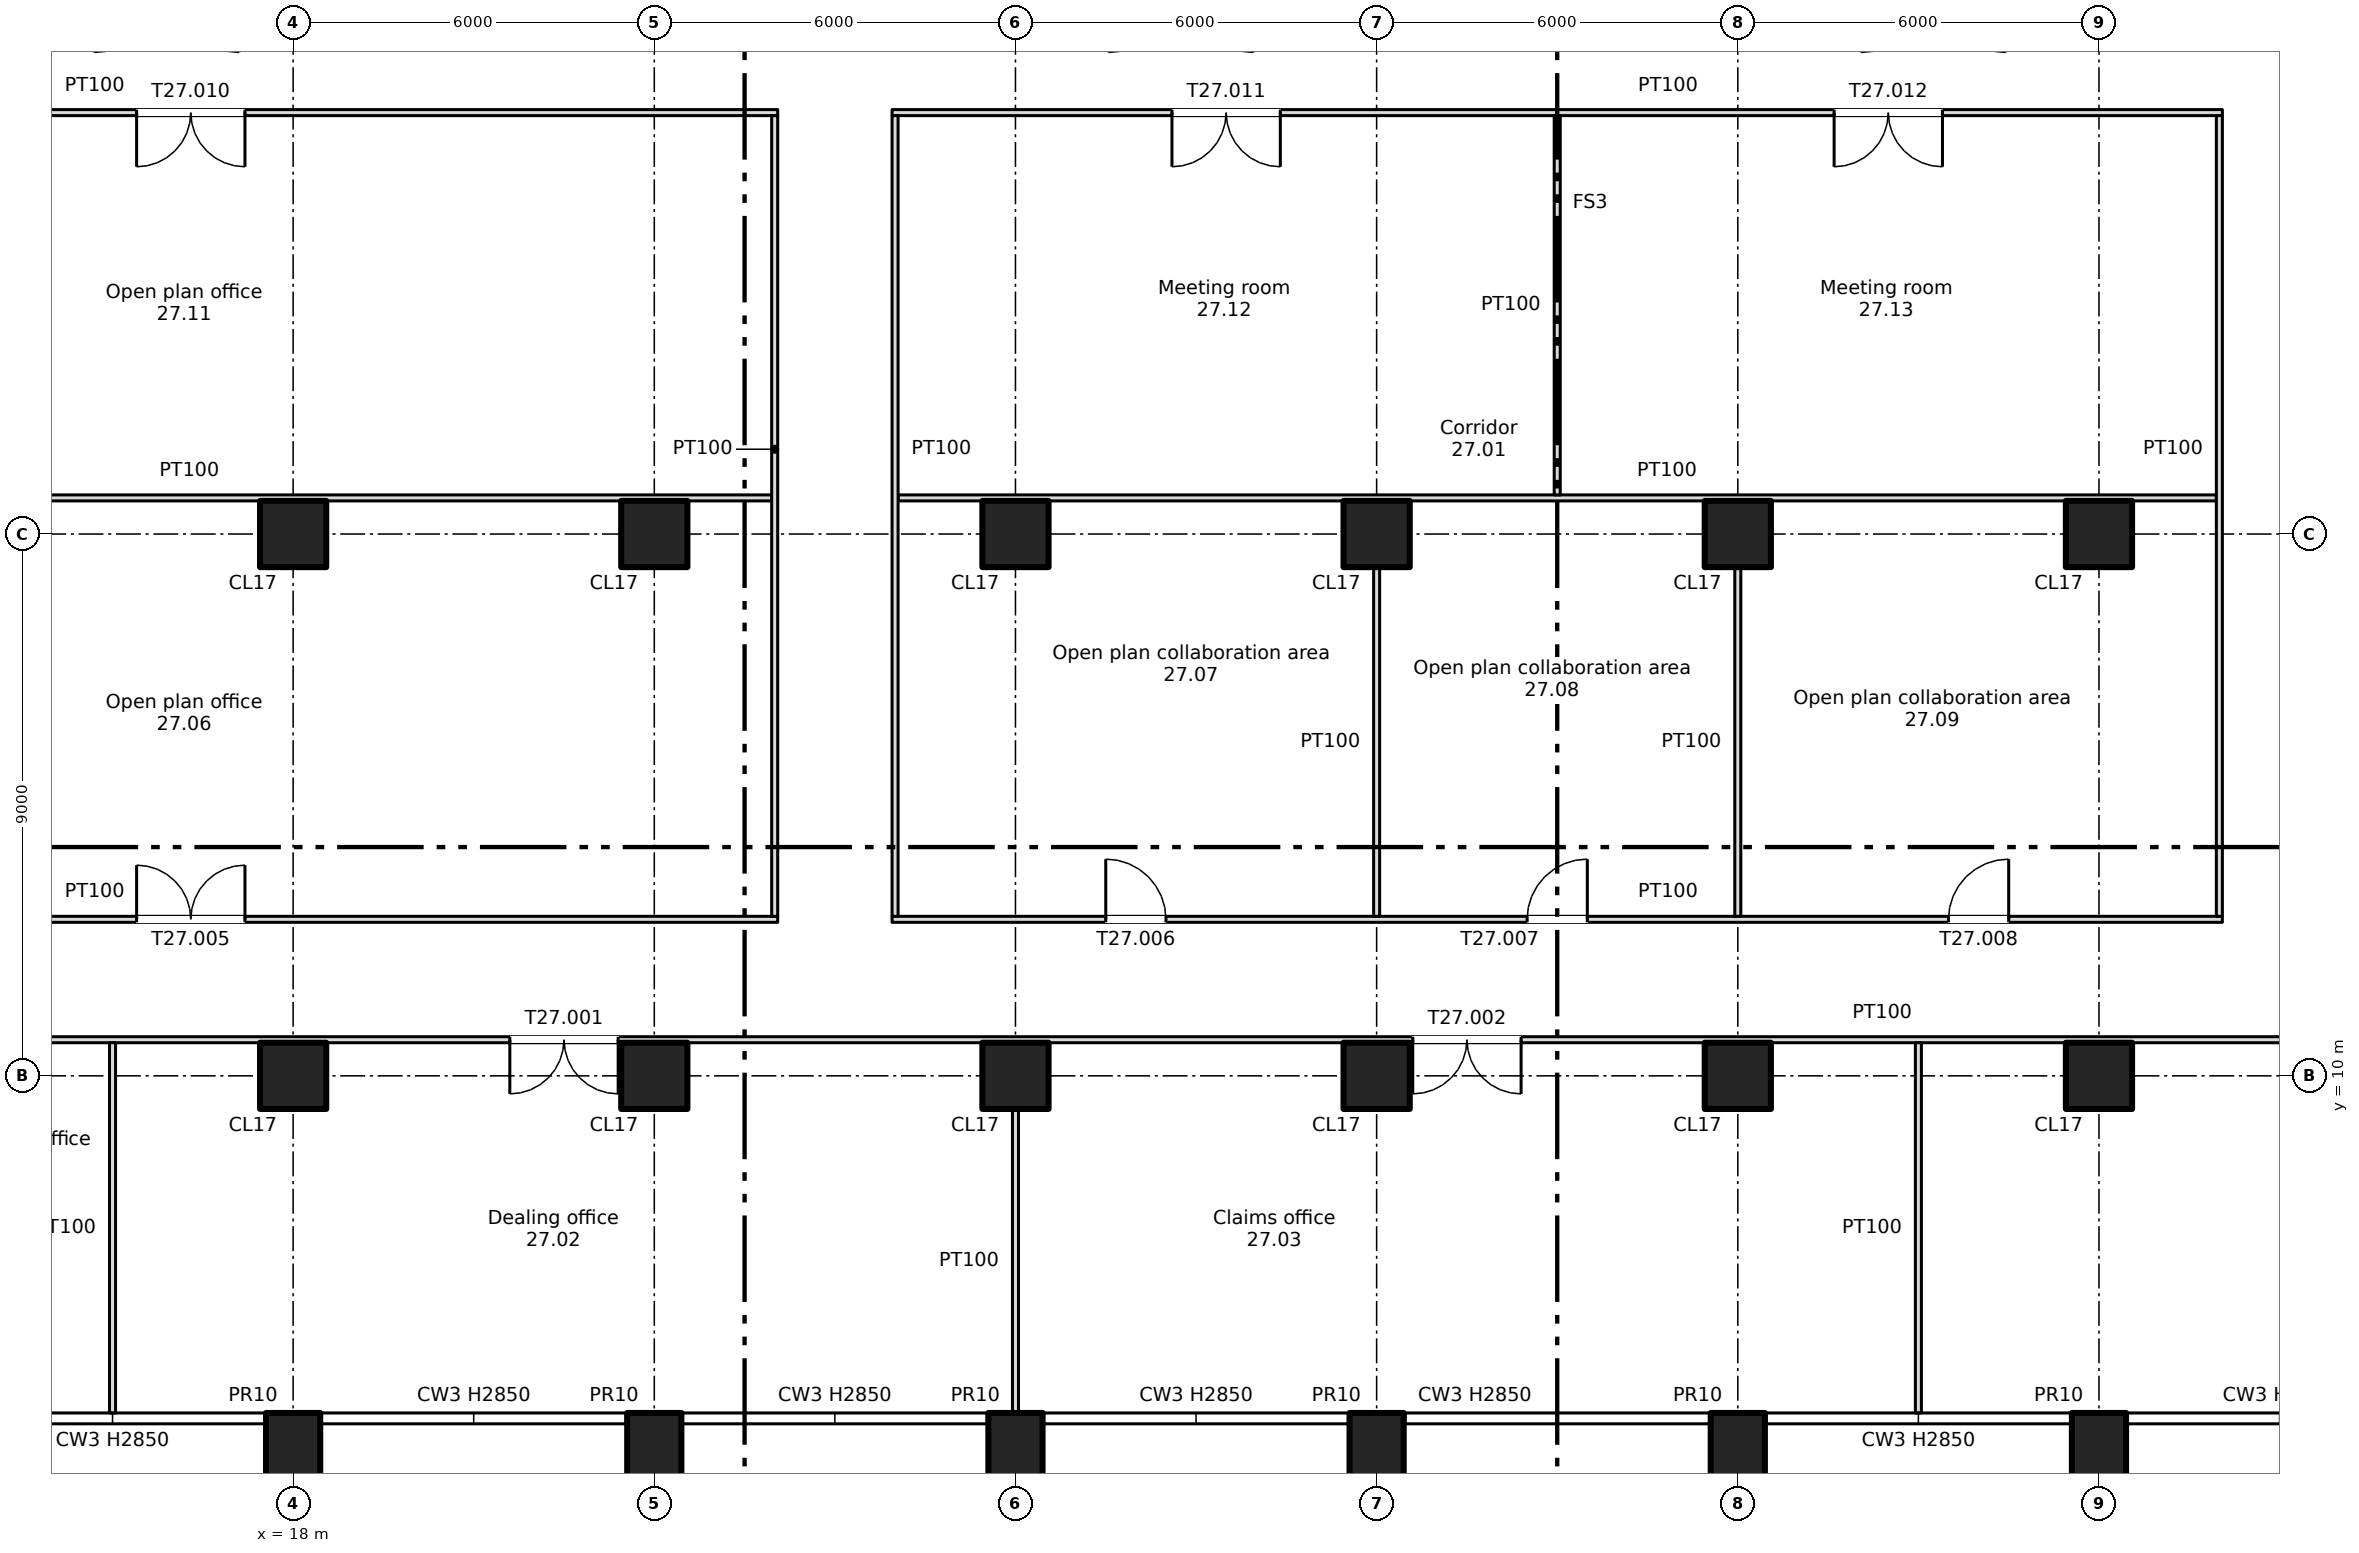
"""IFC4 building model, lengths in metres.
Left out: names, types, materials, properties, quantities, classifications, styles, units other than length and angle.
Written with IfcOpenShell. Run it as: python <this file> out.ifc"""

import sys

from ifc_helpers import new_model, si_unit, direction, frame, frame_2d, origin, origin_2d, place, context, subcontext, project, spatial, rectangle, extrude, element, fill, save


model = new_model("IFC4")
c1 = context("Model", 3, precision=1e-05, world=origin(), true_north=direction((0.0, 1.0)))
c2 = subcontext(c1, "Body", "Model", "MODEL_VIEW")
j1 = project(units=[si_unit("LENGTHUNIT", "METRE"), si_unit("PLANEANGLEUNIT", "RADIAN")], contexts=[c1])
p1 = place(None, origin())
s1 = spatial("IfcSite", under=j1, at=p1, CompositionType="ELEMENT")
p2 = place(p1, origin())
s2 = spatial("IfcBuilding", under=s1, at=p2, CompositionType="ELEMENT")
p3 = place(p2, frame((0.0, 0.0, 189.25)))
s3 = spatial("IfcBuildingStorey", under=s2, at=p3, CompositionType="ELEMENT", Elevation=189.25)
for number, where, z_axis, x_axis in (
    (1, (18.0, 3.7, -0.4), (0.0, 0.0, 1.0), (1.0, 0.0, 0.0)),
    (2, (24.0, 3.7, -0.4), (0.0, 0.0, 1.0), (1.0, 0.0, 0.0)),
    (3, (30.0, 3.7, -0.4), (0.0, 0.0, 1.0), (1.0, 0.0, 0.0)),
    (4, (36.0, 3.7, -0.4), (0.0, 0.0, 1.0), (1.0, 0.0, 0.0)),
    (5, (42.0, 3.7, -0.4), (0.0, 0.0, 1.0), (1.0, 0.0, 0.0)),
    (6, (48.0, 3.7, -0.4), (0.0, 0.0, 1.0), (1.0, 0.0, 0.0)),
):
    element("IfcColumn", number, at=place(p3, frame(where, z_axis=z_axis, x_axis=x_axis)), inside=s3, PredefinedType="COLUMN", context=c2, shape_type="SweptSolid", body=[
        extrude(rectangle(XDim=0.9, YDim=1.4, at=origin_2d()), origin(), (0.0, 0.0, 1.0), 3.75),
    ])
for number, where, z_axis, x_axis in (
    (7, (18.0, 10.0, 0.0), (0.0, 0.0, 1.0), (1.0, 0.0, 0.0)),
    (8, (18.0, 19.0, 0.0), (0.0, 0.0, 1.0), (1.0, 0.0, 0.0)),
    (9, (24.0, 10.0, 0.0), (0.0, 0.0, 1.0), (1.0, 0.0, 0.0)),
    (10, (24.0, 19.0, 0.0), (0.0, 0.0, 1.0), (1.0, 0.0, 0.0)),
    (11, (30.0, 10.0, 0.0), (0.0, 0.0, 1.0), (1.0, 0.0, 0.0)),
    (12, (30.0, 19.0, 0.0), (0.0, 0.0, 1.0), (1.0, 0.0, 0.0)),
    (13, (36.0, 10.0, 0.0), (0.0, 0.0, 1.0), (1.0, 0.0, 0.0)),
    (14, (36.0, 19.0, 0.0), (0.0, 0.0, 1.0), (1.0, 0.0, 0.0)),
    (15, (42.0, 10.0, 0.0), (0.0, 0.0, 1.0), (1.0, 0.0, 0.0)),
    (16, (42.0, 19.0, 0.0), (0.0, 0.0, 1.0), (1.0, 0.0, 0.0)),
    (17, (48.0, 10.0, 0.0), (0.0, 0.0, 1.0), (1.0, 0.0, 0.0)),
    (18, (48.0, 19.0, 0.0), (0.0, 0.0, 1.0), (1.0, 0.0, 0.0)),
):
    element("IfcColumn", number, at=place(p3, frame(where, z_axis=z_axis, x_axis=x_axis)), inside=s3, PredefinedType="COLUMN", context=c2, shape_type="SweptSolid", body=[
        extrude(rectangle(XDim=1.1, YDim=1.1, at=origin_2d()), origin(), (0.0, 0.0, 1.0), 3.35),
    ])
p4 = place(p3, frame((6.6, 10.6, 0.0), z_axis=(0.0, 0.0, 1.0), x_axis=(1.0, 0.0, 0.0)))
e19 = element("IfcWall", 19, at=p4, inside=s3, PredefinedType="PARTITIONING", context=c2, shape_type="SweptSolid", body=[
    extrude(rectangle(XDim=64.8, YDim=0.1, at=frame_2d((32.4, 0.0))), origin(), (0.0, 0.0, 1.0), 3.35),
])
p5 = place(p4, frame((15.0, 0.0, 0.0)))
e20 = element("IfcOpeningElement", 20, at=p5, cuts=e19, PredefinedType="OPENING", context=c2, shape_type="SweptSolid", body=[
    extrude(rectangle(XDim=1.8, YDim=2.1, at=frame_2d((0.9, 1.05))), frame((0.0, 0.06, 0.0), z_axis=(0.0, -1.0, 0.0), x_axis=(1.0, 0.0, 0.0)), (0.0, 0.0, 1.0), 0.12),
])
p6 = place(p4, frame((30.0, 0.0, 0.0)))
e21 = element("IfcOpeningElement", 21, at=p6, cuts=e19, PredefinedType="OPENING", context=c2, shape_type="SweptSolid", body=[
    extrude(rectangle(XDim=1.8, YDim=2.1, at=frame_2d((0.9, 1.05))), frame((0.0, 0.06, 0.0), z_axis=(0.0, -1.0, 0.0), x_axis=(1.0, 0.0, 0.0)), (0.0, 0.0, 1.0), 0.12),
])
p7 = place(p4, frame((50.7, 0.0, 0.0)))
e22 = element("IfcOpeningElement", 22, at=p7, cuts=e19, PredefinedType="OPENING", context=c2, shape_type="SweptSolid", body=[
    extrude(rectangle(XDim=1.8, YDim=2.1, at=frame_2d((0.9, 1.05))), frame((0.0, 0.06, 0.0), z_axis=(0.0, -1.0, 0.0), x_axis=(1.0, 0.0, 0.0)), (0.0, 0.0, 1.0), 0.12),
])
p8 = place(p4, frame((3.7, 0.0, 0.0)))
e23 = element("IfcOpeningElement", 23, at=p8, cuts=e19, PredefinedType="OPENING", context=c2, shape_type="SweptSolid", body=[
    extrude(rectangle(XDim=1.0, YDim=2.1, at=frame_2d((0.5, 1.05))), frame((0.0, 0.06, 0.0), z_axis=(0.0, -1.0, 0.0), x_axis=(1.0, 0.0, 0.0)), (0.0, 0.0, 1.0), 0.12),
])
p9 = place(p3, frame((6.6, 12.6, 0.0), z_axis=(0.0, 0.0, 1.0), x_axis=(1.0, 0.0, 0.0)))
e24 = element("IfcWall", 24, at=p9, inside=s3, PredefinedType="PARTITIONING", context=c2, shape_type="SweptSolid", body=[
    extrude(rectangle(XDim=19.45, YDim=0.1, at=frame_2d((9.725, 0.0))), origin(), (0.0, 0.0, 1.0), 3.35),
])
p10 = place(p9, frame((8.8, 0.0, 0.0)))
e25 = element("IfcOpeningElement", 25, at=p10, cuts=e24, PredefinedType="OPENING", context=c2, shape_type="SweptSolid", body=[
    extrude(rectangle(XDim=1.8, YDim=2.1, at=frame_2d((0.9, 1.05))), frame((0.0, 0.06, 0.0), z_axis=(0.0, -1.0, 0.0), x_axis=(1.0, 0.0, 0.0)), (0.0, 0.0, 1.0), 0.12),
])
p11 = place(p3, frame((27.95, 12.6, 0.0), z_axis=(0.0, 0.0, 1.0), x_axis=(1.0, 0.0, 0.0)))
e26 = element("IfcWall", 26, at=p11, inside=s3, PredefinedType="PARTITIONING", context=c2, shape_type="SweptSolid", body=[
    extrude(rectangle(XDim=22.1, YDim=0.1, at=frame_2d((11.05, 0.0))), origin(), (0.0, 0.0, 1.0), 3.35),
])
p12 = place(p11, frame((3.55, 0.0, 0.0)))
e27 = element("IfcOpeningElement", 27, at=p12, cuts=e26, PredefinedType="OPENING", context=c2, shape_type="SweptSolid", body=[
    extrude(rectangle(XDim=1.0, YDim=2.1, at=frame_2d((0.5, 1.05))), frame((0.0, 0.06, 0.0), z_axis=(0.0, -1.0, 0.0), x_axis=(1.0, 0.0, 0.0)), (0.0, 0.0, 1.0), 0.12),
])
p13 = place(p11, frame((10.55, 0.0, 0.0)))
e28 = element("IfcOpeningElement", 28, at=p13, cuts=e26, PredefinedType="OPENING", context=c2, shape_type="SweptSolid", body=[
    extrude(rectangle(XDim=1.0, YDim=2.1, at=frame_2d((0.5, 1.05))), frame((0.0, 0.06, 0.0), z_axis=(0.0, -1.0, 0.0), x_axis=(1.0, 0.0, 0.0)), (0.0, 0.0, 1.0), 0.12),
])
p14 = place(p11, frame((17.55, 0.0, 0.0)))
e29 = element("IfcOpeningElement", 29, at=p14, cuts=e26, PredefinedType="OPENING", context=c2, shape_type="SweptSolid", body=[
    extrude(rectangle(XDim=1.0, YDim=2.1, at=frame_2d((0.5, 1.05))), frame((0.0, 0.06, 0.0), z_axis=(0.0, -1.0, 0.0), x_axis=(1.0, 0.0, 0.0)), (0.0, 0.0, 1.0), 0.12),
])
p15 = place(p3, frame((6.6, 19.6, 0.0), z_axis=(0.0, 0.0, 1.0), x_axis=(1.0, 0.0, 0.0)))
e30 = element("IfcWall", 30, at=p15, inside=s3, PredefinedType="PARTITIONING", context=c2, shape_type="SweptSolid", body=[
    extrude(rectangle(XDim=19.35, YDim=0.1, at=frame_2d((9.675, 0.0))), origin(), (0.0, 0.0, 1.0), 3.35),
])
p16 = place(p3, frame((28.05, 19.6, 0.0), z_axis=(0.0, 0.0, 1.0), x_axis=(1.0, 0.0, 0.0)))
e31 = element("IfcWall", 31, at=p16, inside=s3, PredefinedType="PARTITIONING", context=c2, shape_type="SweptSolid", body=[
    extrude(rectangle(XDim=21.9, YDim=0.1, at=frame_2d((10.95, 0.0))), origin(), (0.0, 0.0, 1.0), 3.35),
])
p17 = place(p3, frame((6.6, 26.0, 0.0), z_axis=(0.0, 0.0, 1.0), x_axis=(1.0, 0.0, 0.0)))
e32 = element("IfcWall", 32, at=p17, inside=s3, PredefinedType="PARTITIONING", context=c2, shape_type="SweptSolid", body=[
    extrude(rectangle(XDim=19.45, YDim=0.1, at=frame_2d((9.725, 0.0))), origin(), (0.0, 0.0, 1.0), 3.35),
])
p18 = place(p17, frame((8.8, 0.0, 0.0)))
e33 = element("IfcOpeningElement", 33, at=p18, cuts=e32, PredefinedType="OPENING", context=c2, shape_type="SweptSolid", body=[
    extrude(rectangle(XDim=1.8, YDim=2.1, at=frame_2d((0.9, 1.05))), frame((0.0, 0.06, 0.0), z_axis=(0.0, -1.0, 0.0), x_axis=(1.0, 0.0, 0.0)), (0.0, 0.0, 1.0), 0.12),
])
p19 = place(p3, frame((27.95, 26.0, 0.0), z_axis=(0.0, 0.0, 1.0), x_axis=(1.0, 0.0, 0.0)))
e34 = element("IfcWall", 34, at=p19, inside=s3, PredefinedType="PARTITIONING", context=c2, shape_type="SweptSolid", body=[
    extrude(rectangle(XDim=22.1, YDim=0.1, at=frame_2d((11.05, 0.0))), origin(), (0.0, 0.0, 1.0), 3.35),
])
p20 = place(p19, frame((4.65, 0.0, 0.0)))
e35 = element("IfcOpeningElement", 35, at=p20, cuts=e34, PredefinedType="OPENING", context=c2, shape_type="SweptSolid", body=[
    extrude(rectangle(XDim=1.8, YDim=2.1, at=frame_2d((0.9, 1.05))), frame((0.0, 0.06, 0.0), z_axis=(0.0, -1.0, 0.0), x_axis=(1.0, 0.0, 0.0)), (0.0, 0.0, 1.0), 0.12),
])
p21 = place(p19, frame((15.65, 0.0, 0.0)))
e36 = element("IfcOpeningElement", 36, at=p21, cuts=e34, PredefinedType="OPENING", context=c2, shape_type="SweptSolid", body=[
    extrude(rectangle(XDim=1.8, YDim=2.1, at=frame_2d((0.9, 1.05))), frame((0.0, 0.06, 0.0), z_axis=(0.0, -1.0, 0.0), x_axis=(1.0, 0.0, 0.0)), (0.0, 0.0, 1.0), 0.12),
])
p22 = place(p3, frame((15.0, 4.4, 0.0), z_axis=(0.0, 0.0, 1.0), x_axis=(0.0, 1.0, 0.0)))
e37 = element("IfcWall", 37, at=p22, inside=s3, PredefinedType="PARTITIONING", context=c2, shape_type="SweptSolid", body=[
    extrude(rectangle(XDim=6.15, YDim=0.1, at=frame_2d((3.075, 0.0))), origin(), (0.0, 0.0, 1.0), 3.35),
])
for number, where, z_axis, x_axis in (
    (38, (26.0, 12.65, 0.0), (0.0, 0.0, 1.0), (0.0, 1.0, 0.0)),
    (39, (28.0, 12.65, 0.0), (0.0, 0.0, 1.0), (0.0, 1.0, 0.0)),
):
    element("IfcWall", number, at=place(p3, frame(where, z_axis=z_axis, x_axis=x_axis)), inside=s3, PredefinedType="PARTITIONING", context=c2, shape_type="SweptSolid", body=[
        extrude(rectangle(XDim=13.3, YDim=0.1, at=frame_2d((6.65, 0.0))), origin(), (0.0, 0.0, 1.0), 3.35),
    ])
p23 = place(p3, frame((30.0, 4.4, 0.0), z_axis=(0.0, 0.0, 1.0), x_axis=(0.0, 1.0, 0.0)))
e40 = element("IfcWall", 40, at=p23, inside=s3, PredefinedType="PARTITIONING", context=c2, shape_type="SweptSolid", body=[
    extrude(rectangle(XDim=5.05, YDim=0.1, at=frame_2d((2.525, 0.0))), origin(), (0.0, 0.0, 1.0), 3.35),
])
p24 = place(p3, frame((36.0, 12.65, 0.0), z_axis=(0.0, 0.0, 1.0), x_axis=(0.0, 1.0, 0.0)))
e41 = element("IfcWall", 41, at=p24, inside=s3, PredefinedType="PARTITIONING", context=c2, shape_type="SweptSolid", body=[
    extrude(rectangle(XDim=5.8, YDim=0.1, at=frame_2d((2.9, 0.0))), origin(), (0.0, 0.0, 1.0), 3.35),
])
p25 = place(p3, frame((39.0, 19.65, 0.0), z_axis=(0.0, 0.0, 1.0), x_axis=(0.0, 1.0, 0.0)))
e42 = element("IfcWall", 42, at=p25, inside=s3, PredefinedType="PARTITIONING", context=c2, shape_type="SweptSolid", body=[
    extrude(rectangle(XDim=6.3, YDim=0.1, at=frame_2d((3.15, 0.0))), origin(), (0.0, 0.0, 1.0), 3.35),
])
p26 = place(p3, frame((42.0, 12.65, 0.0), z_axis=(0.0, 0.0, 1.0), x_axis=(0.0, 1.0, 0.0)))
e43 = element("IfcWall", 43, at=p26, inside=s3, PredefinedType="PARTITIONING", context=c2, shape_type="SweptSolid", body=[
    extrude(rectangle(XDim=5.8, YDim=0.1, at=frame_2d((2.9, 0.0))), origin(), (0.0, 0.0, 1.0), 3.35),
])
p27 = place(p3, frame((45.0, 4.4, 0.0), z_axis=(0.0, 0.0, 1.0), x_axis=(0.0, 1.0, 0.0)))
e44 = element("IfcWall", 44, at=p27, inside=s3, PredefinedType="PARTITIONING", context=c2, shape_type="SweptSolid", body=[
    extrude(rectangle(XDim=6.15, YDim=0.1, at=frame_2d((3.075, 0.0))), origin(), (0.0, 0.0, 1.0), 3.35),
])
p28 = place(p3, frame((50.0, 12.65, 0.0), z_axis=(0.0, 0.0, 1.0), x_axis=(0.0, 1.0, 0.0)))
e45 = element("IfcWall", 45, at=p28, inside=s3, PredefinedType="PARTITIONING", context=c2, shape_type="SweptSolid", body=[
    extrude(rectangle(XDim=13.3, YDim=0.1, at=frame_2d((6.65, 0.0))), origin(), (0.0, 0.0, 1.0), 3.35),
])
p29 = place(p5, origin())
e46 = element("IfcDoor", 46, at=p29, inside=s3, OperationType="DOUBLE_DOOR_SINGLE_SWING", PredefinedType="DOOR", context=c2, shape_type="SweptSolid", body=[
    extrude(rectangle(XDim=1.8, YDim=2.1, at=frame_2d((0.9, 1.05))), frame((0.0, 0.025, 0.0), z_axis=(0.0, -1.0, 0.0), x_axis=(1.0, 0.0, 0.0)), (0.0, 0.0, 1.0), 0.05),
])
fill(e20, e46)
p30 = place(p6, origin())
e47 = element("IfcDoor", 47, at=p30, inside=s3, OperationType="DOUBLE_DOOR_SINGLE_SWING", PredefinedType="DOOR", context=c2, shape_type="SweptSolid", body=[
    extrude(rectangle(XDim=1.8, YDim=2.1, at=frame_2d((0.9, 1.05))), frame((0.0, 0.025, 0.0), z_axis=(0.0, -1.0, 0.0), x_axis=(1.0, 0.0, 0.0)), (0.0, 0.0, 1.0), 0.05),
])
fill(e21, e47)
p31 = place(p10, origin())
e48 = element("IfcDoor", 48, at=p31, inside=s3, OperationType="DOUBLE_DOOR_SINGLE_SWING", PredefinedType="DOOR", context=c2, shape_type="SweptSolid", body=[
    extrude(rectangle(XDim=1.8, YDim=2.1, at=frame_2d((0.9, 1.05))), frame((0.0, 0.025, 0.0), z_axis=(0.0, -1.0, 0.0), x_axis=(1.0, 0.0, 0.0)), (0.0, 0.0, 1.0), 0.05),
])
fill(e25, e48)
p32 = place(p12, origin())
e49 = element("IfcDoor", 49, at=p32, inside=s3, OperationType="SINGLE_SWING_LEFT", PredefinedType="DOOR", context=c2, shape_type="SweptSolid", body=[
    extrude(rectangle(XDim=1.0, YDim=2.1, at=frame_2d((0.5, 1.05))), frame((0.0, 0.025, 0.0), z_axis=(0.0, -1.0, 0.0), x_axis=(1.0, 0.0, 0.0)), (0.0, 0.0, 1.0), 0.05),
])
fill(e27, e49)
p33 = place(p13, origin())
e50 = element("IfcDoor", 50, at=p33, inside=s3, OperationType="SINGLE_SWING_RIGHT", PredefinedType="DOOR", context=c2, shape_type="SweptSolid", body=[
    extrude(rectangle(XDim=1.0, YDim=2.1, at=frame_2d((0.5, 1.05))), frame((0.0, 0.025, 0.0), z_axis=(0.0, -1.0, 0.0), x_axis=(1.0, 0.0, 0.0)), (0.0, 0.0, 1.0), 0.05),
])
fill(e28, e50)
p34 = place(p14, origin())
e51 = element("IfcDoor", 51, at=p34, inside=s3, OperationType="SINGLE_SWING_RIGHT", PredefinedType="DOOR", context=c2, shape_type="SweptSolid", body=[
    extrude(rectangle(XDim=1.0, YDim=2.1, at=frame_2d((0.5, 1.05))), frame((0.0, 0.025, 0.0), z_axis=(0.0, -1.0, 0.0), x_axis=(1.0, 0.0, 0.0)), (0.0, 0.0, 1.0), 0.05),
])
fill(e29, e51)
p35 = place(p18, origin())
e52 = element("IfcDoor", 52, at=p35, inside=s3, OperationType="DOUBLE_DOOR_SINGLE_SWING", PredefinedType="DOOR", context=c2, shape_type="SweptSolid", body=[
    extrude(rectangle(XDim=1.8, YDim=2.1, at=frame_2d((0.9, 1.05))), frame((0.0, 0.025, 0.0), z_axis=(0.0, -1.0, 0.0), x_axis=(1.0, 0.0, 0.0)), (0.0, 0.0, 1.0), 0.05),
])
fill(e33, e52)
p36 = place(p20, origin())
e53 = element("IfcDoor", 53, at=p36, inside=s3, OperationType="DOUBLE_DOOR_SINGLE_SWING", PredefinedType="DOOR", context=c2, shape_type="SweptSolid", body=[
    extrude(rectangle(XDim=1.8, YDim=2.1, at=frame_2d((0.9, 1.05))), frame((0.0, 0.025, 0.0), z_axis=(0.0, -1.0, 0.0), x_axis=(1.0, 0.0, 0.0)), (0.0, 0.0, 1.0), 0.05),
])
fill(e35, e53)
p37 = place(p21, origin())
e54 = element("IfcDoor", 54, at=p37, inside=s3, OperationType="DOUBLE_DOOR_SINGLE_SWING", PredefinedType="DOOR", context=c2, shape_type="SweptSolid", body=[
    extrude(rectangle(XDim=1.8, YDim=2.1, at=frame_2d((0.9, 1.05))), frame((0.0, 0.025, 0.0), z_axis=(0.0, -1.0, 0.0), x_axis=(1.0, 0.0, 0.0)), (0.0, 0.0, 1.0), 0.05),
])
fill(e36, e54)
save(model, sys.argv[1])
